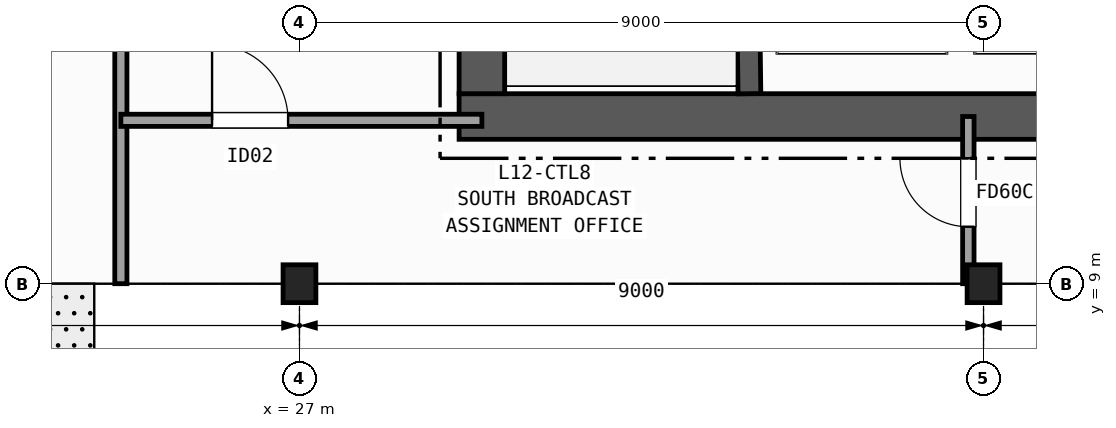
"""IFC4 building model, lengths in metres.
Left out: names, types, materials, properties, quantities, classifications, styles, units other than length and angle.
Written with IfcOpenShell. Run it as: python <this file> out.ifc"""

import sys

from ifc_helpers import new_model, si_unit, direction, frame, frame_2d, origin, origin_2d, place, context, subcontext, project, spatial, rectangle, i_section, extrude, element, fill, save


model = new_model("IFC4")
c1 = context("Model", 3, precision=1e-05, world=origin(), true_north=direction((0.0, 1.0)))
c2 = subcontext(c1, "Body", "Model", "MODEL_VIEW")
j1 = project(units=[si_unit("LENGTHUNIT", "METRE"), si_unit("PLANEANGLEUNIT", "RADIAN")], contexts=[c1])
p1 = place(None, origin())
s1 = spatial("IfcSite", under=j1, at=p1, CompositionType="ELEMENT")
p2 = place(p1, origin())
s2 = spatial("IfcBuilding", under=s1, at=p2, CompositionType="ELEMENT")
p3 = place(p2, frame((0.0, 0.0, 54.5)))
s3 = spatial("IfcBuildingStorey", under=s2, at=p3, CompositionType="ELEMENT", Elevation=54.5)
for number, where, z_axis, x_axis in (
    (1, (27.0, 9.0, 0.0), (0.0, 0.0, 1.0), (1.0, 0.0, 0.0)),
    (2, (36.0, 9.0, 0.0), (0.0, 0.0, 1.0), (1.0, 0.0, 0.0)),
):
    element("IfcColumn", number, at=place(p3, frame(where, z_axis=z_axis, x_axis=x_axis)), inside=s3, PredefinedType="COLUMN", context=c2, shape_type="SweptSolid", body=[
        extrude(i_section(OverallWidth=0.432, OverallDepth=0.498, WebThickness=0.056, FlangeThickness=0.089, FilletRadius=0.015, at=origin_2d()), origin(), (0.0, 0.0, 1.0), 3.7),
    ])
p4 = place(p3, frame((29.1, 11.2, 0.0), z_axis=(0.0, 0.0, 1.0), x_axis=(1.0, 0.0, 0.0)))
e3 = element("IfcWall", 3, at=p4, inside=s3, PredefinedType="SHEAR", context=c2, shape_type="SweptSolid", body=[
    extrude(rectangle(XDim=14.0, YDim=0.6, at=frame_2d((7.0, 0.0))), origin(), (0.0, 0.0, 1.0), 3.42),
])
p5 = place(p3, frame((29.4, 24.3, 0.0), z_axis=(0.0, 0.0, 1.0), x_axis=(0.0, -1.0, 0.0)))
e4 = element("IfcWall", 4, at=p5, inside=s3, PredefinedType="SHEAR", context=c2, shape_type="SweptSolid", body=[
    extrude(rectangle(XDim=12.8, YDim=0.6, at=frame_2d((6.4, 0.0))), origin(), (0.0, 0.0, 1.0), 3.42),
])
p6 = place(p5, frame((1.4, 0.0, 0.0)))
e5 = element("IfcOpeningElement", 5, at=p6, cuts=e4, PredefinedType="OPENING", context=c2, shape_type="SweptSolid", body=[
    extrude(rectangle(XDim=1.35, YDim=2.15, at=frame_2d((0.675, 1.075))), frame((0.0, 0.31, 0.0), z_axis=(0.0, -1.0, 0.0), x_axis=(1.0, 0.0, 0.0)), (0.0, 0.0, 1.0), 0.62),
])
p7 = place(p3, frame((32.92, 11.5, 0.0), z_axis=(0.0, 0.0, 1.0), x_axis=(-0.013244407292, 0.999912288991, 0.0)))
e6 = element("IfcWall", 6, at=p7, inside=s3, PredefinedType="SHEAR", context=c2, shape_type="SweptSolid", body=[
    extrude(rectangle(XDim=9.051, YDim=0.3, at=frame_2d((4.525, 0.0))), origin(), (0.0, 0.0, 1.0), 3.42),
])
p8 = place(p3, frame((24.65, 9.0, 0.0), z_axis=(0.0, 0.0, 1.0), x_axis=(0.0, 1.0, 0.0)))
e7 = element("IfcWall", 7, at=p8, inside=s3, PredefinedType="PARTITIONING", context=c2, shape_type="SweptSolid", body=[
    extrude(rectangle(XDim=19.2, YDim=0.16, at=frame_2d((9.6, 0.0))), origin(), (0.0, 0.0, 1.0), 2.627),
])
p9 = place(p8, frame((12.2, 0.0, 0.0)))
e8 = element("IfcOpeningElement", 8, at=p9, cuts=e7, PredefinedType="OPENING", context=c2, shape_type="SweptSolid", body=[
    extrude(rectangle(XDim=1.05, YDim=2.15, at=frame_2d((0.525, 1.075))), frame((0.0, 0.09, 0.0), z_axis=(0.0, -1.0, 0.0), x_axis=(1.0, 0.0, 0.0)), (0.0, 0.0, 1.0), 0.18),
])
p10 = place(p8, frame((4.2, 0.0, 0.0)))
e9 = element("IfcOpeningElement", 9, at=p10, cuts=e7, PredefinedType="OPENING", context=c2, shape_type="SweptSolid", body=[
    extrude(rectangle(XDim=1.2, YDim=2.15, at=frame_2d((0.6, 1.075))), frame((0.0, 0.09, 0.0), z_axis=(0.0, -1.0, 0.0), x_axis=(1.0, 0.0, 0.0)), (0.0, 0.0, 1.0), 0.18),
])
p11 = place(p3, frame((24.65, 11.15, 0.0), z_axis=(0.0, 0.0, 1.0), x_axis=(1.0, 0.0, 0.0)))
e10 = element("IfcWall", 10, at=p11, inside=s3, PredefinedType="PARTITIONING", context=c2, shape_type="SweptSolid", body=[
    extrude(rectangle(XDim=4.75, YDim=0.16, at=frame_2d((2.375, 0.0))), origin(), (0.0, 0.0, 1.0), 2.792),
])
p12 = place(p11, frame((1.2, 0.0, 0.0)))
e11 = element("IfcOpeningElement", 11, at=p12, cuts=e10, PredefinedType="OPENING", context=c2, shape_type="SweptSolid", body=[
    extrude(rectangle(XDim=1.0, YDim=2.1, at=frame_2d((0.5, 1.05))), frame((0.0, 0.09, 0.0), z_axis=(0.0, -1.0, 0.0), x_axis=(1.0, 0.0, 0.0)), (0.0, 0.0, 1.0), 0.18),
])
p13 = place(p3, frame((35.8, 9.0, 0.0), z_axis=(0.0, 0.0, 1.0), x_axis=(0.0, 1.0, 0.0)))
e12 = element("IfcWall", 12, at=p13, inside=s3, PredefinedType="PARTITIONING", context=c2, shape_type="SweptSolid", body=[
    extrude(rectangle(XDim=2.2, YDim=0.15, at=frame_2d((1.1, 0.0))), origin(), (0.0, 0.0, 1.0), 2.627),
])
p14 = place(p13, frame((0.75, 0.0, 0.0)))
e13 = element("IfcOpeningElement", 13, at=p14, cuts=e12, PredefinedType="OPENING", context=c2, shape_type="SweptSolid", body=[
    extrude(rectangle(XDim=0.9, YDim=2.1, at=frame_2d((0.45, 1.05))), frame((0.0, 0.085, 0.0), z_axis=(0.0, -1.0, 0.0), x_axis=(1.0, 0.0, 0.0)), (0.0, 0.0, 1.0), 0.17),
])
p15 = place(p12, origin())
e14 = element("IfcDoor", 14, at=p15, inside=s3, OperationType="SINGLE_SWING_LEFT", PredefinedType="DOOR", context=c2, shape_type="SweptSolid", body=[
    extrude(rectangle(XDim=1.0, YDim=2.1, at=frame_2d((0.5, 1.05))), frame((0.0, 0.025, 0.0), z_axis=(0.0, -1.0, 0.0), x_axis=(1.0, 0.0, 0.0)), (0.0, 0.0, 1.0), 0.05),
])
fill(e11, e14)
p16 = place(p14, origin())
e15 = element("IfcDoor", 15, at=p16, inside=s3, OperationType="SINGLE_SWING_RIGHT", PredefinedType="DOOR", context=c2, shape_type="SweptSolid", body=[
    extrude(rectangle(XDim=0.9, YDim=2.1, at=frame_2d((0.45, 1.05))), frame((0.0, 0.025, 0.0), z_axis=(0.0, -1.0, 0.0), x_axis=(1.0, 0.0, 0.0)), (0.0, 0.0, 1.0), 0.05),
])
fill(e13, e15)
save(model, sys.argv[1])
